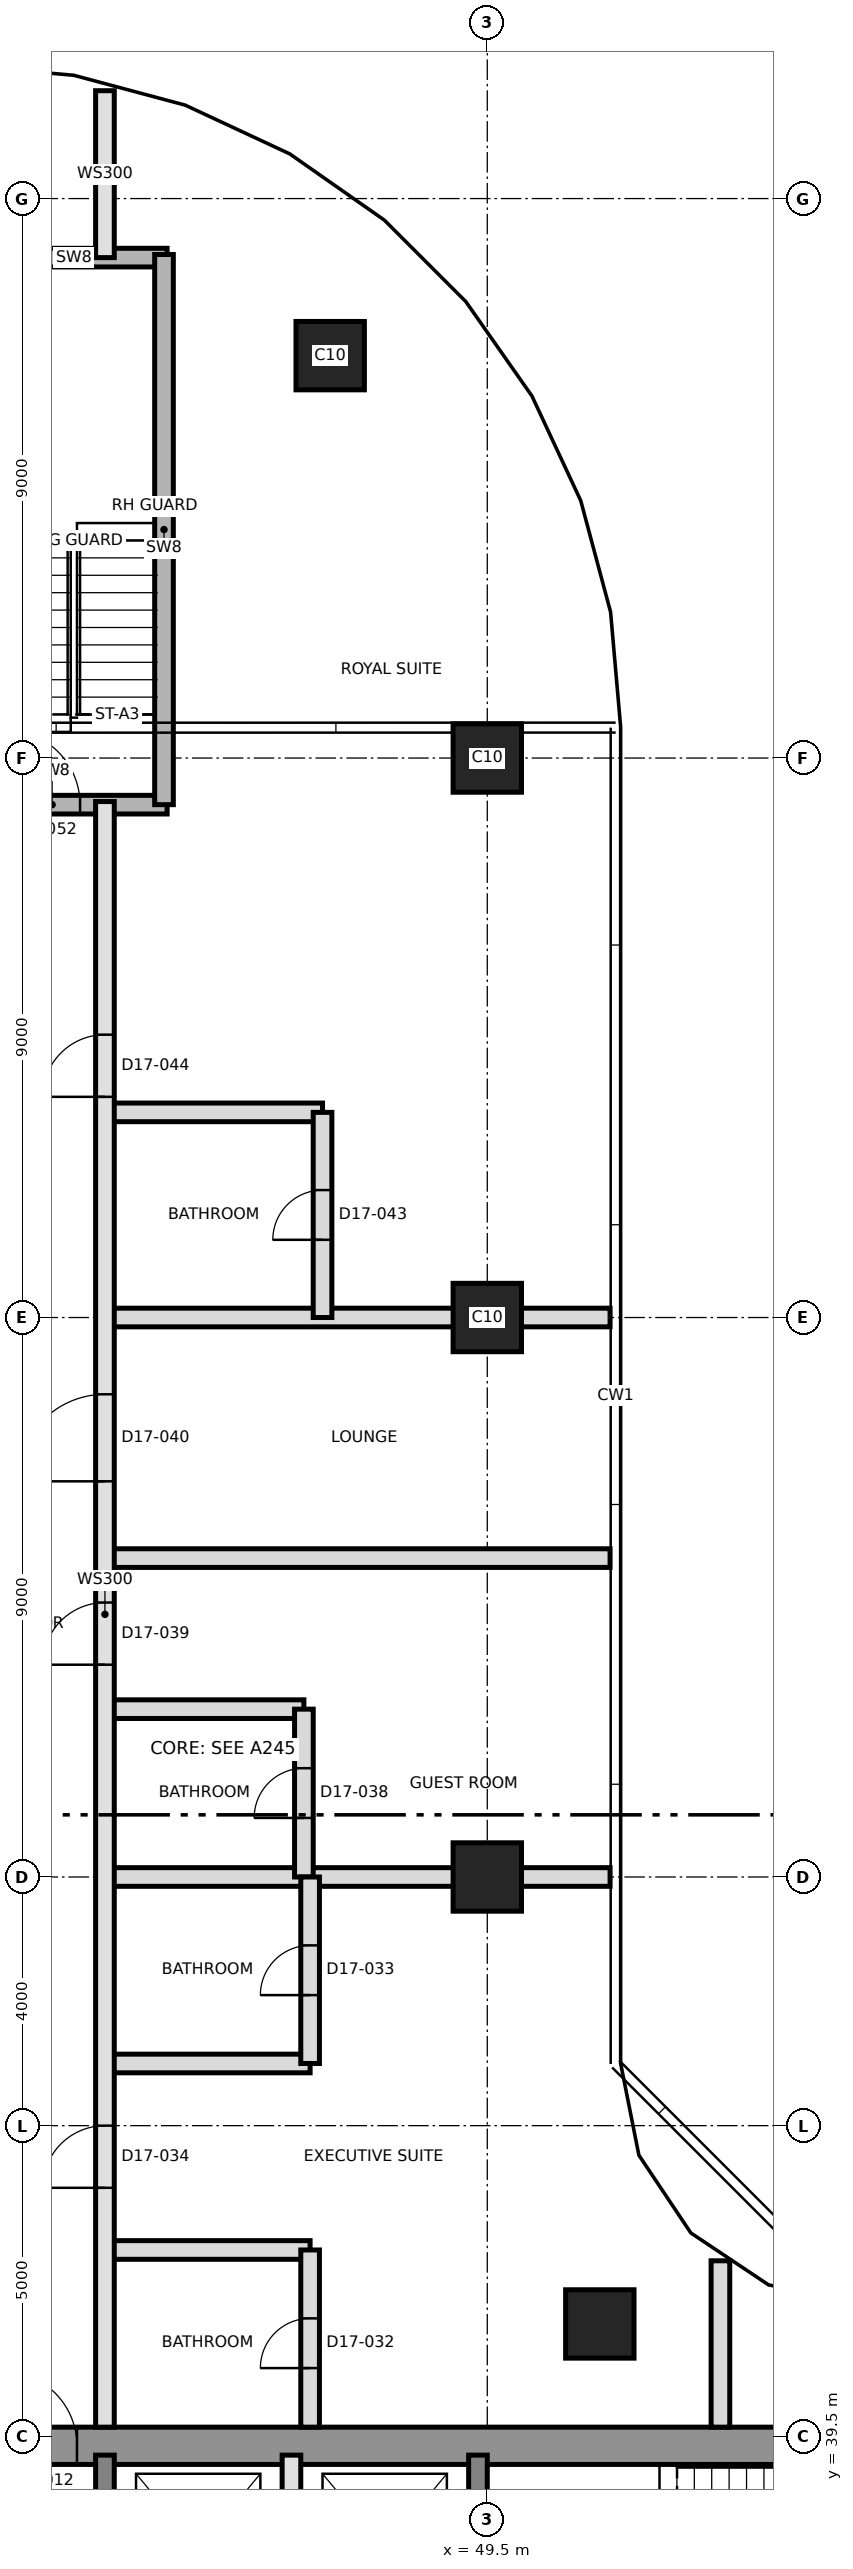
"""IFC4 building model, lengths in metres.
Left out: names, types, materials, properties, quantities, classifications, styles, units other than length and angle.
Written with IfcOpenShell. Run it as: python <this file> out.ifc"""

import sys

from ifc_helpers import new_model, si_unit, direction, frame, frame_2d, origin, origin_2d, place, context, subcontext, project, spatial, rectangle, extrude, element, fill, save


model = new_model("IFC4")
c1 = context("Model", 3, precision=1e-05, world=origin(), true_north=direction((0.0, 1.0)))
c2 = subcontext(c1, "Body", "Model", "MODEL_VIEW")
j1 = project(units=[si_unit("LENGTHUNIT", "METRE"), si_unit("PLANEANGLEUNIT", "RADIAN")], contexts=[c1])
p1 = place(None, origin())
s1 = spatial("IfcSite", under=j1, at=p1, CompositionType="ELEMENT")
p2 = place(p1, origin())
s2 = spatial("IfcBuilding", under=s1, at=p2, CompositionType="ELEMENT")
p3 = place(p2, frame((0.0, 0.0, 171.8)))
s3 = spatial("IfcBuildingStorey", under=s2, at=p3, CompositionType="ELEMENT", Elevation=171.8)
p4 = place(p3, frame((31.2, 39.35, 0.0), z_axis=(0.0, 0.0, 1.0), x_axis=(1.0, 0.0, 0.0)))
e1 = element("IfcWall", 1, at=p4, inside=s3, PredefinedType="SHEAR", context=c2, shape_type="SweptSolid", body=[
    extrude(rectangle(XDim=27.0, YDim=0.6, at=frame_2d((13.5, 0.0))), origin(), (0.0, 0.0, 1.0), 3.7),
])
p5 = place(p4, frame((10.5, 0.0, 0.0)))
e2 = element("IfcOpeningElement", 2, at=p5, cuts=e1, PredefinedType="OPENING", context=c2, shape_type="SweptSolid", body=[
    extrude(rectangle(XDim=1.2, YDim=2.1, at=frame_2d((0.6, 1.05))), frame((0.0, 0.31, 0.0), z_axis=(0.0, -1.0, 0.0), x_axis=(1.0, 0.0, 0.0)), (0.0, 0.0, 1.0), 0.62),
])
for number, where, z_axis, x_axis in (
    (3, (43.35, 33.5, 0.0), (0.0, 0.0, 1.0), (0.0, 1.0, 0.0)),
    (4, (49.35, 33.5, 0.0), (0.0, 0.0, 1.0), (0.0, 1.0, 0.0)),
):
    element("IfcWall", number, at=place(p3, frame(where, z_axis=z_axis, x_axis=x_axis)), inside=s3, PredefinedType="SHEAR", context=c2, shape_type="SweptSolid", body=[
        extrude(rectangle(XDim=5.7, YDim=0.3, at=frame_2d((2.85, 0.0))), origin(), (0.0, 0.0, 1.0), 3.7),
    ])
for number, where, z_axis, x_axis in (
    (5, (51.31, 41.31, 0.0), (0.0, 0.0, 1.0), (1.0, 0.0, 0.0)),
    (6, (49.5, 48.5, 0.0), (0.0, 0.0, 1.0), (1.0, 0.0, 0.0)),
    (7, (49.5, 57.5, 0.0), (0.0, 0.0, 1.0), (1.0, 0.0, 0.0)),
    (8, (49.5, 66.5, 0.0), (0.0, 0.0, 1.0), (1.0, 0.0, 0.0)),
    (9, (46.973, 72.973, 0.0), (0.0, 0.0, 1.0), (1.0, 0.0, 0.0)),
):
    element("IfcColumn", number, at=place(p3, frame(where, z_axis=z_axis, x_axis=x_axis)), inside=s3, PredefinedType="COLUMN", context=c2, shape_type="SweptSolid", body=[
        extrude(rectangle(XDim=1.1, YDim=1.1, at=origin_2d()), origin(), (0.0, 0.0, 1.0), 3.7),
    ])
p6 = place(p3, frame((46.35, 36.2, 0.0), z_axis=(0.0, 0.0, 1.0), x_axis=(0.0, 1.0, 0.0)))
e10 = element("IfcWall", 10, at=p6, inside=s3, PredefinedType="SOLIDWALL", context=c2, shape_type="SweptSolid", body=[
    extrude(rectangle(XDim=3.0, YDim=0.3, at=frame_2d((1.5, 0.0))), origin(), (0.0, 0.0, 1.0), 3.4),
])
for number, where, z_axis, x_axis in (
    (11, (43.35, 42.5, 0.0), (0.0, 0.0, 1.0), (1.0, 0.0, 0.0)),
    (12, (43.35, 45.5, 0.0), (0.0, 0.0, 1.0), (1.0, 0.0, 0.0)),
):
    element("IfcWall", number, at=place(p3, frame(where, z_axis=z_axis, x_axis=x_axis)), inside=s3, PredefinedType="PARTITIONING", context=c2, shape_type="SweptSolid", body=[
        extrude(rectangle(XDim=3.3, YDim=0.3, at=frame_2d((1.65, 0.0))), origin(), (0.0, 0.0, 1.0), 3.4),
    ])
p7 = place(p3, frame((43.35, 48.5, 0.0), z_axis=(0.0, 0.0, 1.0), x_axis=(1.0, 0.0, 0.0)))
e13 = element("IfcWall", 13, at=p7, inside=s3, PredefinedType="PARTITIONING", context=c2, shape_type="SweptSolid", body=[
    extrude(rectangle(XDim=8.125, YDim=0.3, at=frame_2d((4.062, 0.0))), origin(), (0.0, 0.0, 1.0), 3.4),
])
p8 = place(p3, frame((43.35, 51.2, 0.0), z_axis=(0.0, 0.0, 1.0), x_axis=(1.0, 0.0, 0.0)))
e14 = element("IfcWall", 14, at=p8, inside=s3, PredefinedType="PARTITIONING", context=c2, shape_type="SweptSolid", body=[
    extrude(rectangle(XDim=3.2, YDim=0.3, at=frame_2d((1.6, 0.0))), origin(), (0.0, 0.0, 1.0), 3.4),
])
for number, where, z_axis, x_axis in (
    (15, (43.35, 53.63, 0.0), (0.0, 0.0, 1.0), (1.0, 0.0, 0.0)),
    (16, (43.35, 57.5, 0.0), (0.0, 0.0, 1.0), (1.0, 0.0, 0.0)),
):
    element("IfcWall", number, at=place(p3, frame(where, z_axis=z_axis, x_axis=x_axis)), inside=s3, PredefinedType="PARTITIONING", context=c2, shape_type="SweptSolid", body=[
        extrude(rectangle(XDim=8.125, YDim=0.3, at=frame_2d((4.062, 0.0))), origin(), (0.0, 0.0, 1.0), 3.4),
    ])
p9 = place(p3, frame((43.35, 60.8, 0.0), z_axis=(0.0, 0.0, 1.0), x_axis=(1.0, 0.0, 0.0)))
e17 = element("IfcWall", 17, at=p9, inside=s3, PredefinedType="PARTITIONING", context=c2, shape_type="SweptSolid", body=[
    extrude(rectangle(XDim=3.5, YDim=0.3, at=frame_2d((1.75, 0.0))), origin(), (0.0, 0.0, 1.0), 3.4),
])
p10 = place(p3, frame((40.65, 65.75, 0.0), z_axis=(0.0, 0.0, 1.0), x_axis=(1.0, 0.0, 0.0)))
e18 = element("IfcWall", 18, at=p10, inside=s3, PredefinedType="SHEAR", context=c2, shape_type="SweptSolid", body=[
    extrude(rectangle(XDim=3.7, YDim=0.3, at=frame_2d((1.85, 0.0))), origin(), (0.0, 0.0, 1.0), 3.4),
])
p11 = place(p10, frame((1.1, 0.0, 0.0)))
e19 = element("IfcOpeningElement", 19, at=p11, cuts=e18, PredefinedType="OPENING", context=c2, shape_type="SweptSolid", body=[
    extrude(rectangle(XDim=1.2, YDim=2.1, at=frame_2d((0.6, 1.05))), frame((0.0, 0.16, 0.0), z_axis=(0.0, -1.0, 0.0), x_axis=(1.0, 0.0, 0.0)), (0.0, 0.0, 1.0), 0.32),
])
p12 = place(p3, frame((41.35, 74.55, 0.0), z_axis=(0.0, 0.0, 1.0), x_axis=(1.0, 0.0, 0.0)))
e20 = element("IfcWall", 20, at=p12, inside=s3, PredefinedType="SHEAR", context=c2, shape_type="SweptSolid", body=[
    extrude(rectangle(XDim=3.0, YDim=0.3, at=frame_2d((1.5, 0.0))), origin(), (0.0, 0.0, 1.0), 3.4),
])
p13 = place(p3, frame((43.35, 39.65, 0.0), z_axis=(0.0, 0.0, 1.0), x_axis=(0.0, 1.0, 0.0)))
e21 = element("IfcWall", 21, at=p13, inside=s3, PredefinedType="SOLIDWALL", context=c2, shape_type="SweptSolid", body=[
    extrude(rectangle(XDim=26.15, YDim=0.3, at=frame_2d((13.075, 0.0))), origin(), (0.0, 0.0, 1.0), 3.4),
])
p14 = place(p13, frame((3.85, 0.0, 0.0)))
e22 = element("IfcOpeningElement", 22, at=p14, cuts=e21, PredefinedType="OPENING", context=c2, shape_type="SweptSolid", body=[
    extrude(rectangle(XDim=1.0, YDim=2.4, at=frame_2d((0.5, 1.2))), frame((0.0, 0.16, 0.0), z_axis=(0.0, -1.0, 0.0), x_axis=(1.0, 0.0, 0.0)), (0.0, 0.0, 1.0), 0.32),
])
p15 = place(p13, frame((12.265, 0.0, 0.0)))
e23 = element("IfcOpeningElement", 23, at=p15, cuts=e21, PredefinedType="OPENING", context=c2, shape_type="SweptSolid", body=[
    extrude(rectangle(XDim=1.0, YDim=2.1, at=frame_2d((0.5, 1.05))), frame((0.0, 0.16, 0.0), z_axis=(0.0, -1.0, 0.0), x_axis=(1.0, 0.0, 0.0)), (0.0, 0.0, 1.0), 0.32),
])
p16 = place(p13, frame((15.215, 0.0, 0.0)))
e24 = element("IfcOpeningElement", 24, at=p16, cuts=e21, PredefinedType="OPENING", context=c2, shape_type="SweptSolid", body=[
    extrude(rectangle(XDim=1.4, YDim=2.1, at=frame_2d((0.7, 1.05))), frame((0.0, 0.16, 0.0), z_axis=(0.0, -1.0, 0.0), x_axis=(1.0, 0.0, 0.0)), (0.0, 0.0, 1.0), 0.32),
])
p17 = place(p13, frame((21.4, 0.0, 0.0)))
e25 = element("IfcOpeningElement", 25, at=p17, cuts=e21, PredefinedType="OPENING", context=c2, shape_type="SweptSolid", body=[
    extrude(rectangle(XDim=1.0, YDim=2.4, at=frame_2d((0.5, 1.2))), frame((0.0, 0.16, 0.0), z_axis=(0.0, -1.0, 0.0), x_axis=(1.0, 0.0, 0.0)), (0.0, 0.0, 1.0), 0.32),
])
p18 = place(p3, frame((43.35, 74.55, 0.0), z_axis=(0.0, 0.0, 1.0), x_axis=(0.0, 1.0, 0.0)))
e26 = element("IfcWall", 26, at=p18, inside=s3, PredefinedType="SOLIDWALL", context=c2, shape_type="SweptSolid", body=[
    extrude(rectangle(XDim=2.685, YDim=0.3, at=frame_2d((1.343, 0.0))), origin(), (0.0, 0.0, 1.0), 3.4),
])
p19 = place(p3, frame((44.3, 65.75, 0.0), z_axis=(0.0, 0.0, 1.0), x_axis=(0.0, 1.0, 0.0)))
e27 = element("IfcWall", 27, at=p19, inside=s3, PredefinedType="SHEAR", context=c2, shape_type="SweptSolid", body=[
    extrude(rectangle(XDim=8.85, YDim=0.3, at=frame_2d((4.425, 0.0))), origin(), (0.0, 0.0, 1.0), 3.4),
])
p20 = place(p3, frame((46.55, 48.5, 0.0), z_axis=(0.0, 0.0, 1.0), x_axis=(0.0, 1.0, 0.0)))
e28 = element("IfcWall", 28, at=p20, inside=s3, PredefinedType="PARTITIONING", context=c2, shape_type="SweptSolid", body=[
    extrude(rectangle(XDim=2.7, YDim=0.3, at=frame_2d((1.35, 0.0))), origin(), (0.0, 0.0, 1.0), 3.4),
])
p21 = place(p20, frame((0.95, 0.0, 0.0)))
e29 = element("IfcOpeningElement", 29, at=p21, cuts=e28, PredefinedType="OPENING", context=c2, shape_type="SweptSolid", body=[
    extrude(rectangle(XDim=0.8, YDim=2.1, at=frame_2d((0.4, 1.05))), frame((0.0, 0.16, 0.0), z_axis=(0.0, -1.0, 0.0), x_axis=(1.0, 0.0, 0.0)), (0.0, 0.0, 1.0), 0.32),
])
p22 = place(p3, frame((46.65, 39.65, 0.0), z_axis=(0.0, 0.0, 1.0), x_axis=(0.0, 1.0, 0.0)))
e30 = element("IfcWall", 30, at=p22, inside=s3, PredefinedType="PARTITIONING", context=c2, shape_type="SweptSolid", body=[
    extrude(rectangle(XDim=2.85, YDim=0.3, at=frame_2d((1.425, 0.0))), origin(), (0.0, 0.0, 1.0), 3.4),
])
p23 = place(p22, frame((0.95, 0.0, 0.0)))
e31 = element("IfcOpeningElement", 31, at=p23, cuts=e30, PredefinedType="OPENING", context=c2, shape_type="SweptSolid", body=[
    extrude(rectangle(XDim=0.8, YDim=2.1, at=frame_2d((0.4, 1.05))), frame((0.0, 0.16, 0.0), z_axis=(0.0, -1.0, 0.0), x_axis=(1.0, 0.0, 0.0)), (0.0, 0.0, 1.0), 0.32),
])
p24 = place(p3, frame((46.65, 45.5, 0.0), z_axis=(0.0, 0.0, 1.0), x_axis=(0.0, 1.0, 0.0)))
e32 = element("IfcWall", 32, at=p24, inside=s3, PredefinedType="PARTITIONING", context=c2, shape_type="SweptSolid", body=[
    extrude(rectangle(XDim=3.0, YDim=0.3, at=frame_2d((1.5, 0.0))), origin(), (0.0, 0.0, 1.0), 3.4),
])
p25 = place(p24, frame((1.1, 0.0, 0.0)))
e33 = element("IfcOpeningElement", 33, at=p25, cuts=e32, PredefinedType="OPENING", context=c2, shape_type="SweptSolid", body=[
    extrude(rectangle(XDim=0.8, YDim=2.1, at=frame_2d((0.4, 1.05))), frame((0.0, 0.16, 0.0), z_axis=(0.0, -1.0, 0.0), x_axis=(1.0, 0.0, 0.0)), (0.0, 0.0, 1.0), 0.32),
])
p26 = place(p3, frame((46.85, 57.5, 0.0), z_axis=(0.0, 0.0, 1.0), x_axis=(0.0, 1.0, 0.0)))
e34 = element("IfcWall", 34, at=p26, inside=s3, PredefinedType="PARTITIONING", context=c2, shape_type="SweptSolid", body=[
    extrude(rectangle(XDim=3.3, YDim=0.3, at=frame_2d((1.65, 0.0))), origin(), (0.0, 0.0, 1.0), 3.4),
])
p27 = place(p26, frame((1.25, 0.0, 0.0)))
e35 = element("IfcOpeningElement", 35, at=p27, cuts=e34, PredefinedType="OPENING", context=c2, shape_type="SweptSolid", body=[
    extrude(rectangle(XDim=0.8, YDim=2.1, at=frame_2d((0.4, 1.05))), frame((0.0, 0.16, 0.0), z_axis=(0.0, -1.0, 0.0), x_axis=(1.0, 0.0, 0.0)), (0.0, 0.0, 1.0), 0.32),
])
p28 = place(p3, frame((53.25, 39.65, 0.0), z_axis=(0.0, 0.0, 1.0), x_axis=(0.0, 1.0, 0.0)))
e36 = element("IfcWall", 36, at=p28, inside=s3, PredefinedType="PARTITIONING", context=c2, shape_type="SweptSolid", body=[
    extrude(rectangle(XDim=2.676, YDim=0.3, at=frame_2d((1.338, 0.0))), origin(), (0.0, 0.0, 1.0), 3.4),
])
p29 = place(p5, origin())
e37 = element("IfcDoor", 37, at=p29, inside=s3, OperationType="SINGLE_SWING_RIGHT", PredefinedType="DOOR", context=c2, shape_type="SweptSolid", body=[
    extrude(rectangle(XDim=1.2, YDim=2.1, at=frame_2d((0.6, 1.05))), frame((0.0, 0.025, 0.0), z_axis=(0.0, -1.0, 0.0), x_axis=(1.0, 0.0, 0.0)), (0.0, 0.0, 1.0), 0.05),
])
fill(e2, e37)
p30 = place(p23, origin())
e38 = element("IfcDoor", 38, at=p30, inside=s3, OperationType="SINGLE_SWING_LEFT", PredefinedType="DOOR", context=c2, shape_type="SweptSolid", body=[
    extrude(rectangle(XDim=0.8, YDim=2.1, at=frame_2d((0.4, 1.05))), frame((0.0, 0.025, 0.0), z_axis=(0.0, -1.0, 0.0), x_axis=(1.0, 0.0, 0.0)), (0.0, 0.0, 1.0), 0.05),
])
fill(e31, e38)
p31 = place(p25, origin())
e39 = element("IfcDoor", 39, at=p31, inside=s3, OperationType="SINGLE_SWING_RIGHT", PredefinedType="DOOR", context=c2, shape_type="SweptSolid", body=[
    extrude(rectangle(XDim=0.8, YDim=2.1, at=frame_2d((0.4, 1.05))), frame((0.0, 0.025, 0.0), z_axis=(0.0, -1.0, 0.0), x_axis=(1.0, 0.0, 0.0)), (0.0, 0.0, 1.0), 0.05),
])
fill(e33, e39)
p32 = place(p14, origin())
e40 = element("IfcDoor", 40, at=p32, inside=s3, OperationType="SINGLE_SWING_LEFT", PredefinedType="DOOR", context=c2, shape_type="SweptSolid", body=[
    extrude(rectangle(XDim=1.0, YDim=2.4, at=frame_2d((0.5, 1.2))), frame((0.0, 0.025, 0.0), z_axis=(0.0, -1.0, 0.0), x_axis=(1.0, 0.0, 0.0)), (0.0, 0.0, 1.0), 0.05),
])
fill(e22, e40)
p33 = place(p21, origin())
e41 = element("IfcDoor", 41, at=p33, inside=s3, OperationType="SINGLE_SWING_LEFT", PredefinedType="DOOR", context=c2, shape_type="SweptSolid", body=[
    extrude(rectangle(XDim=0.8, YDim=2.1, at=frame_2d((0.4, 1.05))), frame((0.0, 0.025, 0.0), z_axis=(0.0, -1.0, 0.0), x_axis=(1.0, 0.0, 0.0)), (0.0, 0.0, 1.0), 0.05),
])
fill(e29, e41)
p34 = place(p15, origin())
e42 = element("IfcDoor", 42, at=p34, inside=s3, OperationType="SINGLE_SWING_LEFT", PredefinedType="DOOR", context=c2, shape_type="SweptSolid", body=[
    extrude(rectangle(XDim=1.0, YDim=2.1, at=frame_2d((0.5, 1.05))), frame((0.0, 0.025, 0.0), z_axis=(0.0, -1.0, 0.0), x_axis=(1.0, 0.0, 0.0)), (0.0, 0.0, 1.0), 0.05),
])
fill(e23, e42)
p35 = place(p16, origin())
e43 = element("IfcDoor", 43, at=p35, inside=s3, OperationType="SINGLE_SWING_RIGHT", PredefinedType="DOOR", context=c2, shape_type="SweptSolid", body=[
    extrude(rectangle(XDim=1.4, YDim=2.1, at=frame_2d((0.7, 1.05))), frame((0.0, 0.025, 0.0), z_axis=(0.0, -1.0, 0.0), x_axis=(1.0, 0.0, 0.0)), (0.0, 0.0, 1.0), 0.05),
])
fill(e24, e43)
p36 = place(p27, origin())
e44 = element("IfcDoor", 44, at=p36, inside=s3, OperationType="SINGLE_SWING_LEFT", PredefinedType="DOOR", context=c2, shape_type="SweptSolid", body=[
    extrude(rectangle(XDim=0.8, YDim=2.1, at=frame_2d((0.4, 1.05))), frame((0.0, 0.025, 0.0), z_axis=(0.0, -1.0, 0.0), x_axis=(1.0, 0.0, 0.0)), (0.0, 0.0, 1.0), 0.05),
])
fill(e35, e44)
p37 = place(p17, origin())
e45 = element("IfcDoor", 45, at=p37, inside=s3, OperationType="SINGLE_SWING_RIGHT", PredefinedType="DOOR", context=c2, shape_type="SweptSolid", body=[
    extrude(rectangle(XDim=1.0, YDim=2.4, at=frame_2d((0.5, 1.2))), frame((0.0, 0.025, 0.0), z_axis=(0.0, -1.0, 0.0), x_axis=(1.0, 0.0, 0.0)), (0.0, 0.0, 1.0), 0.05),
])
fill(e25, e45)
p38 = place(p11, origin())
e46 = element("IfcDoor", 46, at=p38, inside=s3, OperationType="SINGLE_SWING_RIGHT", PredefinedType="DOOR", context=c2, shape_type="SweptSolid", body=[
    extrude(rectangle(XDim=1.2, YDim=2.1, at=frame_2d((0.6, 1.05))), frame((0.0, 0.025, 0.0), z_axis=(0.0, -1.0, 0.0), x_axis=(1.0, 0.0, 0.0)), (0.0, 0.0, 1.0), 0.05),
])
fill(e19, e46)
save(model, sys.argv[1])
